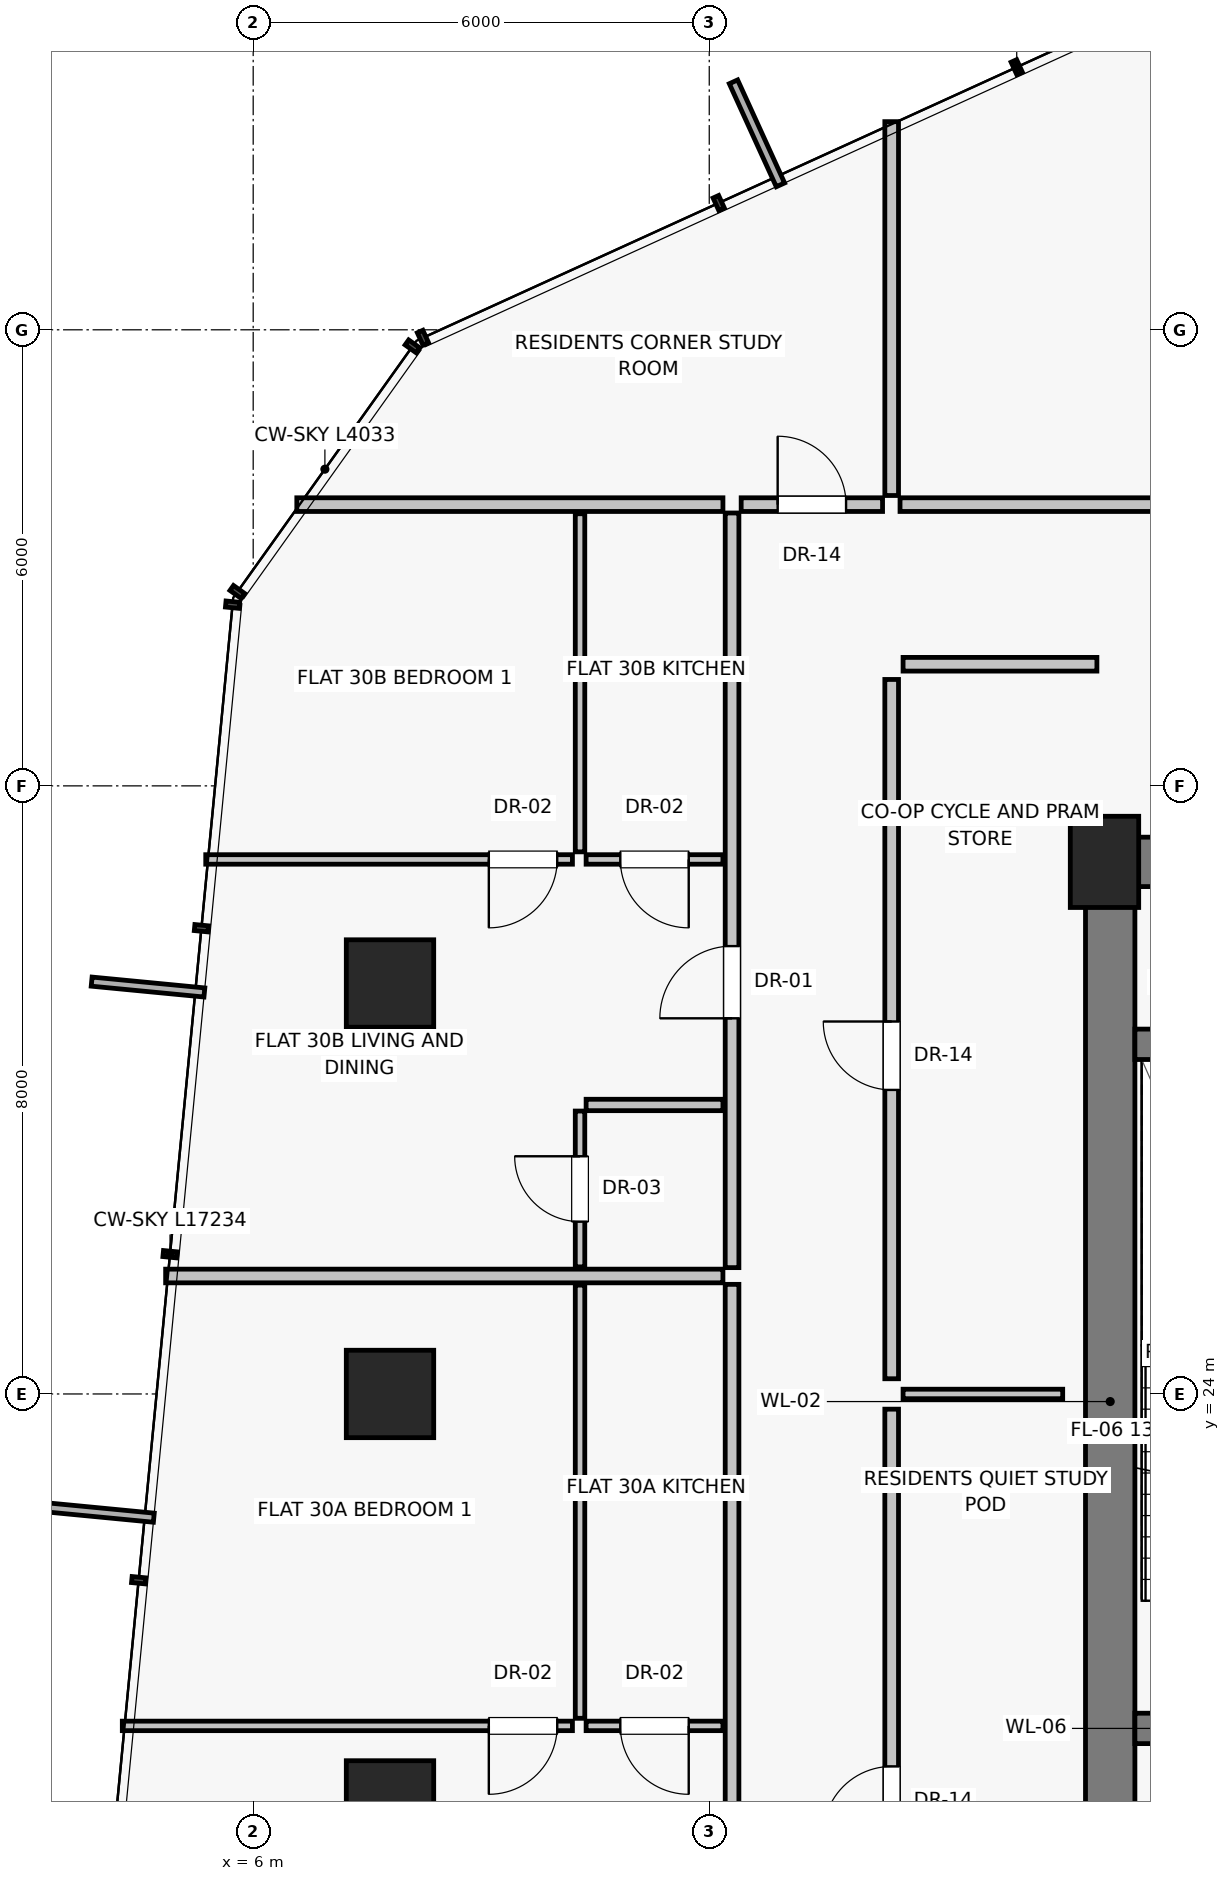
"""IFC4 building model, lengths in metres.
Left out: names, types, materials, properties, quantities, classifications, styles, units other than length and angle.
Written with IfcOpenShell. Run it as: python <this file> out.ifc"""

import sys

from ifc_helpers import new_model, si_unit, direction, frame, frame_2d, origin, origin_2d, place, context, subcontext, project, spatial, rectangle, extrude, source, transform, mapped, element, fill, save


model = new_model("IFC4")
c1 = context("Model", 3, precision=1e-05, world=origin(), true_north=direction((0.0, 1.0)))
c2 = subcontext(c1, "Body", "Model", "MODEL_VIEW")
j1 = project(units=[si_unit("LENGTHUNIT", "METRE"), si_unit("PLANEANGLEUNIT", "RADIAN")], contexts=[c1])
p1 = place(None, origin())
s1 = spatial("IfcSite", under=j1, at=p1, CompositionType="ELEMENT")
p2 = place(p1, origin())
s2 = spatial("IfcBuilding", under=s1, at=p2, CompositionType="ELEMENT")
p3 = place(p2, frame((0.0, 0.0, 108.95)))
s3 = spatial("IfcBuildingStorey", under=s2, at=p3, CompositionType="ELEMENT", Elevation=108.95)
p4 = place(p3, frame((17.2, 31.0, 0.0), z_axis=(0.0, 0.0, 1.0), x_axis=(1.0, 0.0, 0.0)))
e1 = element("IfcColumn", 1, at=p4, inside=s3, PredefinedType="PILASTER", context=c2, shape_type="SweptSolid", body=[
    extrude(rectangle(XDim=0.9, YDim=1.2, at=origin_2d()), origin(), (0.0, 0.0, 1.0), 4.3),
])
for number, where, z_axis, x_axis in (
    (2, (7.8, 29.4, 0.0), (0.0, 0.0, 1.0), (1.0, 0.0, 0.0)),
    (3, (7.8, 24.0, 0.0), (0.0, 0.0, 1.0), (1.0, 0.0, 0.0)),
    (4, (7.8, 18.6, 0.0), (0.0, 0.0, 1.0), (1.0, 0.0, 0.0)),
):
    element("IfcColumn", number, at=place(p3, frame(where, z_axis=z_axis, x_axis=x_axis)), inside=s3, PredefinedType="COLUMN", context=c2, shape_type="SweptSolid", body=[
        extrude(rectangle(XDim=1.15, YDim=1.15, at=origin_2d()), origin(), (0.0, 0.0, 1.0), 4.3),
    ])
p5 = place(p3, frame((17.275, 16.8, 0.0), z_axis=(0.0, 0.0, 1.0), x_axis=(0.0, 1.0, 0.0)))
e5 = element("IfcWall", 5, at=p5, inside=s3, PredefinedType="SHEAR", context=c2, shape_type="SweptSolid", body=[
    extrude(rectangle(XDim=14.2, YDim=0.65, at=frame_2d((7.1, 0.0))), origin(), (0.0, 0.0, 1.0), 4.05),
])
p6 = place(p3, frame((17.2, 31.0, 0.0), z_axis=(0.0, 0.0, 1.0), x_axis=(1.0, 0.0, 0.0)))
e6 = element("IfcWall", 6, at=p6, inside=s3, PredefinedType="SHEAR", context=c2, shape_type="SweptSolid", body=[
    extrude(rectangle(XDim=3.8, YDim=0.65, at=frame_2d((1.9, 0.0))), origin(), (0.0, 0.0, 1.0), 4.05),
])
p7 = place(p6, frame((1.25, 0.0, 0.0)))
e7 = element("IfcOpeningElement", 7, at=p7, cuts=e6, PredefinedType="OPENING", context=c2, shape_type="SweptSolid", body=[
    extrude(rectangle(XDim=0.86, YDim=2.01, at=frame_2d((0.43, 1.005))), frame((0.0, 0.335, 0.0), z_axis=(0.0, -1.0, 0.0), x_axis=(1.0, 0.0, 0.0)), (0.0, 0.0, 1.0), 0.67),
])
p8 = place(p3, frame((17.6, 19.6, 0.0), z_axis=(0.0, 0.0, 1.0), x_axis=(1.0, 0.0, 0.0)))
e8 = element("IfcWall", 8, at=p8, inside=s3, PredefinedType="SHEAR", context=c2, shape_type="SweptSolid", body=[
    extrude(rectangle(XDim=3.4, YDim=0.4, at=frame_2d((1.7, 0.0))), origin(), (0.0, 0.0, 1.0), 4.05),
])
p9 = place(p8, frame((1.05, 0.0, 0.0)))
e9 = element("IfcOpeningElement", 9, at=p9, cuts=e8, PredefinedType="OPENING", context=c2, shape_type="SweptSolid", body=[
    extrude(rectangle(XDim=1.1, YDim=2.03, at=frame_2d((0.55, 1.015))), frame((0.0, 0.21, 0.0), z_axis=(0.0, -1.0, 0.0), x_axis=(1.0, 0.0, 0.0)), (0.0, 0.0, 1.0), 0.42),
])
p10 = place(p3, frame((17.6, 28.6, 0.0), z_axis=(0.0, 0.0, 1.0), x_axis=(1.0, 0.0, 0.0)))
e10 = element("IfcWall", 10, at=p10, inside=s3, PredefinedType="SHEAR", context=c2, shape_type="SweptSolid", body=[
    extrude(rectangle(XDim=3.4, YDim=0.4, at=frame_2d((1.7, 0.0))), origin(), (0.0, 0.0, 1.0), 4.05),
])
p11 = place(p3, frame((14.4, 14.4, 0.0), z_axis=(0.0, 0.0, 1.0), x_axis=(0.0, 1.0, 0.0)))
e11 = element("IfcWall", 11, at=p11, inside=s3, PredefinedType="PARTITIONING", context=c2, shape_type="SweptSolid", body=[
    extrude(rectangle(XDim=9.4, YDim=0.18, at=frame_2d((4.7, 0.0))), origin(), (0.0, 0.0, 1.0), 4.05),
])
p12 = place(p11, frame((3.8, 0.0, 0.0)))
e12 = element("IfcOpeningElement", 12, at=p12, cuts=e11, PredefinedType="OPENING", context=c2, shape_type="SweptSolid", body=[
    extrude(rectangle(XDim=0.9, YDim=2.01, at=frame_2d((0.45, 1.005))), frame((0.0, 0.1, 0.0), z_axis=(0.0, -1.0, 0.0), x_axis=(1.0, 0.0, 0.0)), (0.0, 0.0, 1.0), 0.2),
])
p13 = place(p3, frame((14.4, 24.2, 0.0), z_axis=(0.0, 0.0, 1.0), x_axis=(0.0, 1.0, 0.0)))
e13 = element("IfcWall", 13, at=p13, inside=s3, PredefinedType="PARTITIONING", context=c2, shape_type="SweptSolid", body=[
    extrude(rectangle(XDim=9.2, YDim=0.18, at=frame_2d((4.6, 0.0))), origin(), (0.0, 0.0, 1.0), 4.05),
])
p14 = place(p13, frame((3.8, 0.0, 0.0)))
e14 = element("IfcOpeningElement", 14, at=p14, cuts=e13, PredefinedType="OPENING", context=c2, shape_type="SweptSolid", body=[
    extrude(rectangle(XDim=0.9, YDim=2.01, at=frame_2d((0.45, 1.005))), frame((0.0, 0.1, 0.0), z_axis=(0.0, -1.0, 0.0), x_axis=(1.0, 0.0, 0.0)), (0.0, 0.0, 1.0), 0.2),
])
p15 = place(p3, frame((14.55, 24.0, 0.0), z_axis=(0.0, 0.0, 1.0), x_axis=(1.0, 0.0, 0.0)))
e15 = element("IfcWall", 15, at=p15, inside=s3, PredefinedType="PARTITIONING", context=c2, shape_type="SweptSolid", body=[
    extrude(rectangle(XDim=2.1, YDim=0.125, at=frame_2d((1.05, 0.0))), origin(), (0.0, 0.0, 1.0), 4.05),
])
p16 = place(p3, frame((14.55, 33.6, 0.0), z_axis=(0.0, 0.0, 1.0), x_axis=(1.0, 0.0, 0.0)))
e16 = element("IfcWall", 16, at=p16, inside=s3, PredefinedType="PARTITIONING", context=c2, shape_type="SweptSolid", body=[
    extrude(rectangle(XDim=2.55, YDim=0.18, at=frame_2d((1.275, 0.0))), origin(), (0.0, 0.0, 1.0), 4.05),
])
p17 = place(p3, frame((14.4, 35.82, 0.0), z_axis=(0.0, 0.0, 1.0), x_axis=(0.0, 1.0, 0.0)))
e17 = element("IfcWall", 17, at=p17, inside=s3, PredefinedType="PARTITIONING", context=c2, shape_type="SweptSolid", body=[
    extrude(rectangle(XDim=4.918, YDim=0.18, at=frame_2d((2.459, 0.0))), origin(), (0.0, 0.0, 1.0), 4.05),
])
p18 = place(p3, frame((14.51, 35.7, 0.0), z_axis=(0.0, 0.0, 1.0), x_axis=(1.0, 0.0, 0.0)))
e18 = element("IfcWall", 18, at=p18, inside=s3, PredefinedType="PARTITIONING", context=c2, shape_type="SweptSolid", body=[
    extrude(rectangle(XDim=10.724, YDim=0.18, at=frame_2d((5.362, 0.0))), origin(), (0.0, 0.0, 1.0), 3.63),
])
p19 = place(p18, frame((4.462, 0.0, 0.0)))
e19 = element("IfcOpeningElement", 19, at=p19, cuts=e18, PredefinedType="OPENING", context=c2, shape_type="SweptSolid", body=[
    extrude(rectangle(XDim=1.8, YDim=2.25, at=frame_2d((0.9, 1.125))), frame((0.0, 0.1, 0.0), z_axis=(0.0, -1.0, 0.0), x_axis=(1.0, 0.0, 0.0)), (0.0, 0.0, 1.0), 0.2),
])
p20 = place(p3, frame((12.18, 35.7, 0.0), z_axis=(0.0, 0.0, 1.0), x_axis=(-1.0, 0.0, 0.0)))
e20 = element("IfcWall", 20, at=p20, inside=s3, PredefinedType="PARTITIONING", context=c2, shape_type="SweptSolid", body=[
    extrude(rectangle(XDim=5.606, YDim=0.18, at=frame_2d((2.803, 0.0))), origin(), (0.0, 0.0, 1.0), 4.05),
])
p21 = place(p3, frame((12.3, 12.21, 0.0), z_axis=(0.0, 0.0, 1.0), x_axis=(0.0, 1.0, 0.0)))
e21 = element("IfcWall", 21, at=p21, inside=s3, PredefinedType="PARTITIONING", context=c2, shape_type="SweptSolid", body=[
    extrude(rectangle(XDim=13.232, YDim=0.18, at=frame_2d((6.616, 0.0))), origin(), (0.0, 0.0, 1.0), 3.63),
])
p22 = place(p21, frame((4.306, 0.0, 0.0)))
e22 = element("IfcOpeningElement", 22, at=p22, cuts=e21, PredefinedType="OPENING", context=c2, shape_type="SweptSolid", body=[
    extrude(rectangle(XDim=0.95, YDim=2.02, at=frame_2d((0.475, 1.01))), frame((0.0, 0.1, 0.0), z_axis=(0.0, -1.0, 0.0), x_axis=(1.0, 0.0, 0.0)), (0.0, 0.0, 1.0), 0.2),
])
p23 = place(p3, frame((12.18, 19.633, 0.0), z_axis=(0.0, 0.0, 1.0), x_axis=(-1.0, 0.0, 0.0)))
e23 = element("IfcWall", 23, at=p23, inside=s3, PredefinedType="PARTITIONING", context=c2, shape_type="SweptSolid", body=[
    extrude(rectangle(XDim=1.8, YDim=0.125, at=frame_2d((0.9, 0.0))), origin(), (0.0, 0.0, 1.0), 4.05),
])
p24 = place(p23, frame((0.45, 0.0, 0.0)))
e24 = element("IfcOpeningElement", 24, at=p24, cuts=e23, PredefinedType="OPENING", context=c2, shape_type="SweptSolid", body=[
    extrude(rectangle(XDim=0.9, YDim=2.01, at=frame_2d((0.45, 1.005))), frame((0.0, 0.073, 0.0), z_axis=(0.0, -1.0, 0.0), x_axis=(1.0, 0.0, 0.0)), (0.0, 0.0, 1.0), 0.145),
])
p25 = place(p3, frame((10.3, 19.733, 0.0), z_axis=(0.0, 0.0, 1.0), x_axis=(0.0, 1.0, 0.0)))
e25 = element("IfcWall", 25, at=p25, inside=s3, PredefinedType="PARTITIONING", context=c2, shape_type="SweptSolid", body=[
    extrude(rectangle(XDim=5.699, YDim=0.125, at=frame_2d((2.85, 0.0))), origin(), (0.0, 0.0, 1.0), 4.05),
])
p26 = place(p3, frame((10.2, 19.633, 0.0), z_axis=(0.0, 0.0, 1.0), x_axis=(-1.0, 0.0, 0.0)))
e26 = element("IfcWall", 26, at=p26, inside=s3, PredefinedType="PARTITIONING", context=c2, shape_type="SweptSolid", body=[
    extrude(rectangle(XDim=5.922, YDim=0.125, at=frame_2d((2.961, 0.0))), origin(), (0.0, 0.0, 1.0), 4.05),
])
p27 = place(p26, frame((0.2, 0.0, 0.0)))
e27 = element("IfcOpeningElement", 27, at=p27, cuts=e26, PredefinedType="OPENING", context=c2, shape_type="SweptSolid", body=[
    extrude(rectangle(XDim=0.9, YDim=2.01, at=frame_2d((0.45, 1.005))), frame((0.0, 0.073, 0.0), z_axis=(0.0, -1.0, 0.0), x_axis=(1.0, 0.0, 0.0)), (0.0, 0.0, 1.0), 0.145),
])
p28 = place(p3, frame((12.18, 25.552, 0.0), z_axis=(0.0, 0.0, 1.0), x_axis=(-1.0, 0.0, 0.0)))
e28 = element("IfcWall", 28, at=p28, inside=s3, PredefinedType="PARTITIONING", context=c2, shape_type="SweptSolid", body=[
    extrude(rectangle(XDim=7.332, YDim=0.18, at=frame_2d((3.666, 0.0))), origin(), (0.0, 0.0, 1.0), 4.05),
])
p29 = place(p3, frame((12.3, 25.662, 0.0), z_axis=(0.0, 0.0, 1.0), x_axis=(0.0, 1.0, 0.0)))
e29 = element("IfcWall", 29, at=p29, inside=s3, PredefinedType="PARTITIONING", context=c2, shape_type="SweptSolid", body=[
    extrude(rectangle(XDim=9.928, YDim=0.18, at=frame_2d((4.964, 0.0))), origin(), (0.0, 0.0, 1.0), 3.63),
])
p30 = place(p29, frame((3.28, 0.0, 0.0)))
e30 = element("IfcOpeningElement", 30, at=p30, cuts=e29, PredefinedType="OPENING", context=c2, shape_type="SweptSolid", body=[
    extrude(rectangle(XDim=0.95, YDim=2.02, at=frame_2d((0.475, 1.01))), frame((0.0, 0.1, 0.0), z_axis=(0.0, -1.0, 0.0), x_axis=(1.0, 0.0, 0.0)), (0.0, 0.0, 1.0), 0.2),
])
p31 = place(p3, frame((12.18, 27.802, 0.0), z_axis=(0.0, 0.0, 1.0), x_axis=(-1.0, 0.0, 0.0)))
e31 = element("IfcWall", 31, at=p31, inside=s3, PredefinedType="PARTITIONING", context=c2, shape_type="SweptSolid", body=[
    extrude(rectangle(XDim=1.8, YDim=0.15, at=frame_2d((0.9, 0.0))), origin(), (0.0, 0.0, 1.0), 4.05),
])
p32 = place(p3, frame((10.3, 25.672, 0.0), z_axis=(0.0, 0.0, 1.0), x_axis=(0.0, 1.0, 0.0)))
e32 = element("IfcWall", 32, at=p32, inside=s3, PredefinedType="PARTITIONING", context=c2, shape_type="SweptSolid", body=[
    extrude(rectangle(XDim=2.05, YDim=0.125, at=frame_2d((1.025, 0.0))), origin(), (0.0, 0.0, 1.0), 4.05),
])
p33 = place(p32, frame((0.595, 0.0, 0.0)))
e33 = element("IfcOpeningElement", 33, at=p33, cuts=e32, PredefinedType="OPENING", context=c2, shape_type="SweptSolid", body=[
    extrude(rectangle(XDim=0.86, YDim=2.01, at=frame_2d((0.43, 1.005))), frame((0.0, 0.073, 0.0), z_axis=(0.0, -1.0, 0.0), x_axis=(1.0, 0.0, 0.0)), (0.0, 0.0, 1.0), 0.145),
])
p34 = place(p3, frame((12.18, 31.032, 0.0), z_axis=(0.0, 0.0, 1.0), x_axis=(-1.0, 0.0, 0.0)))
e34 = element("IfcWall", 34, at=p34, inside=s3, PredefinedType="PARTITIONING", context=c2, shape_type="SweptSolid", body=[
    extrude(rectangle(XDim=1.8, YDim=0.125, at=frame_2d((0.9, 0.0))), origin(), (0.0, 0.0, 1.0), 4.05),
])
p35 = place(p34, frame((0.45, 0.0, 0.0)))
e35 = element("IfcOpeningElement", 35, at=p35, cuts=e34, PredefinedType="OPENING", context=c2, shape_type="SweptSolid", body=[
    extrude(rectangle(XDim=0.9, YDim=2.01, at=frame_2d((0.45, 1.005))), frame((0.0, 0.073, 0.0), z_axis=(0.0, -1.0, 0.0), x_axis=(1.0, 0.0, 0.0)), (0.0, 0.0, 1.0), 0.145),
])
p36 = place(p3, frame((10.3, 31.132, 0.0), z_axis=(0.0, 0.0, 1.0), x_axis=(0.0, 1.0, 0.0)))
e36 = element("IfcWall", 36, at=p36, inside=s3, PredefinedType="PARTITIONING", context=c2, shape_type="SweptSolid", body=[
    extrude(rectangle(XDim=4.448, YDim=0.125, at=frame_2d((2.224, 0.0))), origin(), (0.0, 0.0, 1.0), 4.05),
])
p37 = place(p3, frame((10.2, 31.032, 0.0), z_axis=(0.0, 0.0, 1.0), x_axis=(-1.0, 0.0, 0.0)))
e37 = element("IfcWall", 37, at=p37, inside=s3, PredefinedType="PARTITIONING", context=c2, shape_type="SweptSolid", body=[
    extrude(rectangle(XDim=4.824, YDim=0.125, at=frame_2d((2.412, 0.0))), origin(), (0.0, 0.0, 1.0), 4.05),
])
p38 = place(p37, frame((0.2, 0.0, 0.0)))
e38 = element("IfcOpeningElement", 38, at=p38, cuts=e37, PredefinedType="OPENING", context=c2, shape_type="SweptSolid", body=[
    extrude(rectangle(XDim=0.9, YDim=2.01, at=frame_2d((0.45, 1.005))), frame((0.0, 0.073, 0.0), z_axis=(0.0, -1.0, 0.0), x_axis=(1.0, 0.0, 0.0)), (0.0, 0.0, 1.0), 0.145),
])
p39 = place(p3, frame((12.42, 35.7, 0.0), z_axis=(0.0, 0.0, 1.0), x_axis=(1.0, 0.0, 0.0)))
e39 = element("IfcWall", 39, at=p39, inside=s3, PredefinedType="PARTITIONING", context=c2, shape_type="SweptSolid", body=[
    extrude(rectangle(XDim=1.86, YDim=0.18, at=frame_2d((0.93, 0.0))), origin(), (0.0, 0.0, 1.0), 4.05),
])
p40 = place(p39, frame((0.48, 0.0, 0.0)))
e40 = element("IfcOpeningElement", 40, at=p40, cuts=e39, PredefinedType="OPENING", context=c2, shape_type="SweptSolid", body=[
    extrude(rectangle(XDim=0.9, YDim=2.01, at=frame_2d((0.45, 1.005))), frame((0.0, 0.1, 0.0), z_axis=(0.0, -1.0, 0.0), x_axis=(1.0, 0.0, 0.0)), (0.0, 0.0, 1.0), 0.2),
])
m1 = source(origin(), c2, "Body", "SweptSolid", [
    extrude(rectangle(XDim=0.9, YDim=2.01, at=frame_2d((0.45, 1.005))), frame((0.0, 0.025, 0.0), z_axis=(0.0, -1.0, 0.0), x_axis=(1.0, 0.0, 0.0)), (0.0, 0.0, 1.0), 0.05),
])
p41 = place(p12, origin())
e41 = element("IfcDoor", 41, at=p41, inside=s3, OperationType="SINGLE_SWING_LEFT", PredefinedType="DOOR", context=c2, shape_type="MappedRepresentation", body=[
    mapped(m1, transform((0.0, 0.0, 0.0), scale=1.0)),
])
fill(e12, e41)
p42 = place(p14, origin())
e42 = element("IfcDoor", 42, at=p42, inside=s3, OperationType="SINGLE_SWING_RIGHT", PredefinedType="DOOR", context=c2, shape_type="MappedRepresentation", body=[
    mapped(m1, transform((0.0, 0.0, 0.0), scale=1.0)),
])
fill(e14, e42)
p43 = place(p24, origin())
e43 = element("IfcDoor", 43, at=p43, inside=s3, OperationType="SINGLE_SWING_LEFT", PredefinedType="DOOR", context=c2, shape_type="MappedRepresentation", body=[
    mapped(m1, transform((0.0, 0.0, 0.0), scale=1.0)),
])
fill(e24, e43)
p44 = place(p27, origin())
e44 = element("IfcDoor", 44, at=p44, inside=s3, OperationType="SINGLE_SWING_RIGHT", PredefinedType="DOOR", context=c2, shape_type="MappedRepresentation", body=[
    mapped(m1, transform((0.0, 0.0, 0.0), scale=1.0)),
])
fill(e27, e44)
m2 = source(origin(), c2, "Body", "SweptSolid", [
    extrude(rectangle(XDim=0.95, YDim=2.02, at=frame_2d((0.475, 1.01))), frame((0.0, 0.025, 0.0), z_axis=(0.0, -1.0, 0.0), x_axis=(1.0, 0.0, 0.0)), (0.0, 0.0, 1.0), 0.05),
])
p45 = place(p30, origin())
e45 = element("IfcDoor", 45, at=p45, inside=s3, OperationType="SINGLE_SWING_LEFT", PredefinedType="DOOR", context=c2, shape_type="MappedRepresentation", body=[
    mapped(m2, transform((0.0, 0.0, 0.0), scale=1.0)),
])
fill(e30, e45)
m3 = source(origin(), c2, "Body", "SweptSolid", [
    extrude(rectangle(XDim=0.86, YDim=2.01, at=frame_2d((0.43, 1.005))), frame((0.0, 0.025, 0.0), z_axis=(0.0, -1.0, 0.0), x_axis=(1.0, 0.0, 0.0)), (0.0, 0.0, 1.0), 0.05),
])
p46 = place(p33, origin())
e46 = element("IfcDoor", 46, at=p46, inside=s3, OperationType="SINGLE_SWING_RIGHT", PredefinedType="DOOR", context=c2, shape_type="MappedRepresentation", body=[
    mapped(m3, transform((0.0, 0.0, 0.0), scale=1.0)),
])
fill(e33, e46)
p47 = place(p35, origin())
e47 = element("IfcDoor", 47, at=p47, inside=s3, OperationType="SINGLE_SWING_LEFT", PredefinedType="DOOR", context=c2, shape_type="MappedRepresentation", body=[
    mapped(m1, transform((0.0, 0.0, 0.0), scale=1.0)),
])
fill(e35, e47)
p48 = place(p38, origin())
e48 = element("IfcDoor", 48, at=p48, inside=s3, OperationType="SINGLE_SWING_RIGHT", PredefinedType="DOOR", context=c2, shape_type="MappedRepresentation", body=[
    mapped(m1, transform((0.0, 0.0, 0.0), scale=1.0)),
])
fill(e38, e48)
p49 = place(p40, origin())
e49 = element("IfcDoor", 49, at=p49, inside=s3, OperationType="SINGLE_SWING_LEFT", PredefinedType="DOOR", context=c2, shape_type="MappedRepresentation", body=[
    mapped(m1, transform((0.0, 0.0, 0.0), scale=1.0)),
])
fill(e40, e49)
save(model, sys.argv[1])
